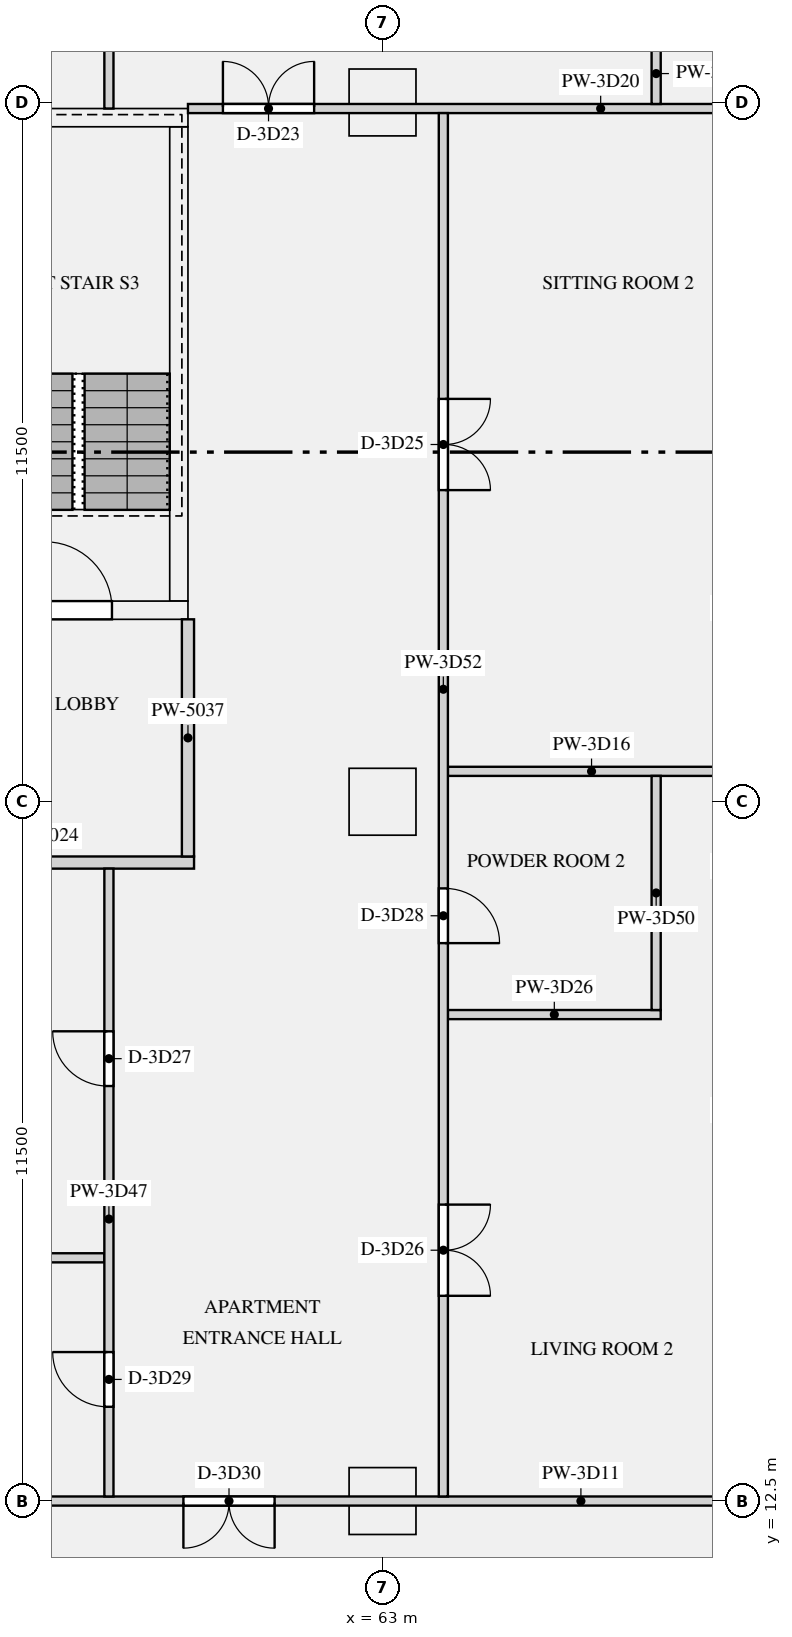
"""IFC4 building model, lengths in metres.
Left out: names, types, materials, properties, quantities, classifications, styles, units other than length and angle.
Written with IfcOpenShell. Run it as: python <this file> out.ifc"""

import sys

from ifc_helpers import new_model, si_unit, direction, frame, frame_2d, origin, origin_2d, place, context, subcontext, project, spatial, rectangle, extrude, element, fill, save


model = new_model("IFC4")
c1 = context("Model", 3, precision=1e-05, world=origin(), true_north=direction((0.0, 1.0)))
c2 = subcontext(c1, "Body", "Model", "MODEL_VIEW")
j1 = project(units=[si_unit("LENGTHUNIT", "METRE"), si_unit("PLANEANGLEUNIT", "RADIAN")], contexts=[c1])
p1 = place(None, origin())
s1 = spatial("IfcSite", under=j1, at=p1, CompositionType="ELEMENT")
p2 = place(p1, origin())
s2 = spatial("IfcBuilding", under=s1, at=p2, CompositionType="ELEMENT")
p3 = place(p2, frame((0.0, 0.0, 166.5)))
s3 = spatial("IfcBuildingStorey", under=s2, at=p3, CompositionType="ELEMENT", Elevation=166.5)
for number, where, z_axis, x_axis in (
    (1, (63.0, 24.0, 0.0), (0.0, 0.0, 1.0), (1.0, 0.0, 0.0)),
    (2, (63.0, 35.5, 0.0), (0.0, 0.0, 1.0), (1.0, 0.0, 0.0)),
    (3, (63.0, 12.5, 0.0), (0.0, 0.0, 1.0), (1.0, 0.0, 0.0)),
):
    element("IfcColumn", number, at=place(p3, frame(where, z_axis=z_axis, x_axis=x_axis)), inside=s3, PredefinedType="COLUMN", context=c2, shape_type="SweptSolid", body=[
        extrude(rectangle(XDim=1.1, YDim=1.1, at=origin_2d()), origin(), (0.0, 0.0, 1.0), 3.15),
    ])
p4 = place(p3, frame((56.2, 27.15, 0.0), z_axis=(0.0, 0.0, 1.0), x_axis=(1.0, 0.0, 0.0)))
e4 = element("IfcWall", 4, at=p4, inside=s3, PredefinedType="SHEAR", context=c2, shape_type="SweptSolid", body=[
    extrude(rectangle(XDim=3.6, YDim=0.3, at=frame_2d((1.8, 0.0))), origin(), (0.0, 0.0, 1.0), 3.15),
])
p5 = place(p4, frame((1.25, 0.0, 0.0)))
e5 = element("IfcOpeningElement", 5, at=p5, cuts=e4, PredefinedType="OPENING", context=c2, shape_type="SweptSolid", body=[
    extrude(rectangle(XDim=1.1, YDim=2.1, at=frame_2d((0.55, 1.05))), frame((0.0, 0.16, 0.0), z_axis=(0.0, -1.0, 0.0), x_axis=(1.0, 0.0, 0.0)), (0.0, 0.0, 1.0), 0.32),
])
p6 = place(p3, frame((56.2, 35.25, 0.0), z_axis=(0.0, 0.0, 1.0), x_axis=(1.0, 0.0, 0.0)))
e6 = element("IfcWall", 6, at=p6, inside=s3, PredefinedType="SHEAR", context=c2, shape_type="SweptSolid", body=[
    extrude(rectangle(XDim=3.6, YDim=0.3, at=frame_2d((1.8, 0.0))), origin(), (0.0, 0.0, 1.0), 3.15),
])
p7 = place(p3, frame((59.65, 27.3, 0.0), z_axis=(0.0, 0.0, 1.0), x_axis=(0.0, 1.0, 0.0)))
e7 = element("IfcWall", 7, at=p7, inside=s3, PredefinedType="SHEAR", context=c2, shape_type="SweptSolid", body=[
    extrude(rectangle(XDim=7.8, YDim=0.3, at=frame_2d((3.9, 0.0))), origin(), (0.0, 0.0, 1.0), 3.15),
])
p8 = place(p3, frame((54.9, 23.0, 0.0), z_axis=(0.0, 0.0, 1.0), x_axis=(1.0, 0.0, 0.0)))
e8 = element("IfcWall", 8, at=p8, inside=s3, PredefinedType="PARTITIONING", context=c2, shape_type="SweptSolid", body=[
    extrude(rectangle(XDim=5.0, YDim=0.2, at=frame_2d((2.5, 0.0))), origin(), (0.0, 0.0, 1.0), 2.83),
])
p9 = place(p3, frame((59.8, 23.1, 0.0), z_axis=(0.0, 0.0, 1.0), x_axis=(0.0, 1.0, 0.0)))
e9 = element("IfcWall", 9, at=p9, inside=s3, PredefinedType="PARTITIONING", context=c2, shape_type="SweptSolid", body=[
    extrude(rectangle(XDim=3.9, YDim=0.2, at=frame_2d((1.95, 0.0))), origin(), (0.0, 0.0, 1.0), 2.83),
])
p10 = place(p3, frame((54.0, 12.5, 0.0), z_axis=(0.0, 0.0, 1.0), x_axis=(1.0, 0.0, 0.0)))
e10 = element("IfcWall", 10, at=p10, inside=s3, PredefinedType="PARTITIONING", context=c2, shape_type="SweptSolid", body=[
    extrude(rectangle(XDim=17.3, YDim=0.15, at=frame_2d((8.65, 0.0))), origin(), (0.0, 0.0, 1.0), 2.83),
])
p11 = place(p10, frame((5.725, 0.0, 0.0)))
e11 = element("IfcOpeningElement", 11, at=p11, cuts=e10, PredefinedType="OPENING", context=c2, shape_type="SweptSolid", body=[
    extrude(rectangle(XDim=1.5, YDim=2.1, at=frame_2d((0.75, 1.05))), frame((0.0, 0.085, 0.0), z_axis=(0.0, -1.0, 0.0), x_axis=(1.0, 0.0, 0.0)), (0.0, 0.0, 1.0), 0.17),
])
p12 = place(p3, frame((54.1, 16.5, 0.0), z_axis=(0.0, 0.0, 1.0), x_axis=(1.0, 0.0, 0.0)))
e12 = element("IfcWall", 12, at=p12, inside=s3, PredefinedType="PARTITIONING", context=c2, shape_type="SweptSolid", body=[
    extrude(rectangle(XDim=4.325, YDim=0.15, at=frame_2d((2.163, 0.0))), origin(), (0.0, 0.0, 1.0), 2.83),
])
p13 = place(p3, frame((64.075, 24.5, 0.0), z_axis=(0.0, 0.0, 1.0), x_axis=(1.0, 0.0, 0.0)))
e13 = element("IfcWall", 13, at=p13, inside=s3, PredefinedType="PARTITIONING", context=c2, shape_type="SweptSolid", body=[
    extrude(rectangle(XDim=4.725, YDim=0.15, at=frame_2d((2.363, 0.0))), origin(), (0.0, 0.0, 1.0), 2.83),
])
p14 = place(p3, frame((59.8, 35.4, 0.0), z_axis=(0.0, 0.0, 1.0), x_axis=(1.0, 0.0, 0.0)))
e14 = element("IfcWall", 14, at=p14, inside=s3, PredefinedType="PARTITIONING", context=c2, shape_type="SweptSolid", body=[
    extrude(rectangle(XDim=11.5, YDim=0.15, at=frame_2d((5.75, 0.0))), origin(), (0.0, 0.0, 1.0), 2.83),
])
p15 = place(p14, frame((0.575, 0.0, 0.0)))
e15 = element("IfcOpeningElement", 15, at=p15, cuts=e14, PredefinedType="OPENING", context=c2, shape_type="SweptSolid", body=[
    extrude(rectangle(XDim=1.5, YDim=2.1, at=frame_2d((0.75, 1.05))), frame((0.0, 0.085, 0.0), z_axis=(0.0, -1.0, 0.0), x_axis=(1.0, 0.0, 0.0)), (0.0, 0.0, 1.0), 0.17),
])
p16 = place(p3, frame((64.075, 20.5, 0.0), z_axis=(0.0, 0.0, 1.0), x_axis=(1.0, 0.0, 0.0)))
e16 = element("IfcWall", 16, at=p16, inside=s3, PredefinedType="PARTITIONING", context=c2, shape_type="SweptSolid", body=[
    extrude(rectangle(XDim=3.5, YDim=0.15, at=frame_2d((1.75, 0.0))), origin(), (0.0, 0.0, 1.0), 2.83),
])
p17 = place(p3, frame((58.5, 12.575, 0.0), z_axis=(0.0, 0.0, 1.0), x_axis=(0.0, 1.0, 0.0)))
e17 = element("IfcWall", 17, at=p17, inside=s3, PredefinedType="PARTITIONING", context=c2, shape_type="SweptSolid", body=[
    extrude(rectangle(XDim=10.325, YDim=0.15, at=frame_2d((5.163, 0.0))), origin(), (0.0, 0.0, 1.0), 2.83),
])
p18 = place(p17, frame((6.75, 0.0, 0.0)))
e18 = element("IfcOpeningElement", 18, at=p18, cuts=e17, PredefinedType="OPENING", context=c2, shape_type="SweptSolid", body=[
    extrude(rectangle(XDim=0.9, YDim=2.1, at=frame_2d((0.45, 1.05))), frame((0.0, 0.085, 0.0), z_axis=(0.0, -1.0, 0.0), x_axis=(1.0, 0.0, 0.0)), (0.0, 0.0, 1.0), 0.17),
])
p19 = place(p17, frame((1.475, 0.0, 0.0)))
e19 = element("IfcOpeningElement", 19, at=p19, cuts=e17, PredefinedType="OPENING", context=c2, shape_type="SweptSolid", body=[
    extrude(rectangle(XDim=0.9, YDim=2.1, at=frame_2d((0.45, 1.05))), frame((0.0, 0.085, 0.0), z_axis=(0.0, -1.0, 0.0), x_axis=(1.0, 0.0, 0.0)), (0.0, 0.0, 1.0), 0.17),
])
p20 = place(p3, frame((58.5, 35.4, 0.0), z_axis=(0.0, 0.0, 1.0), x_axis=(0.0, 1.0, 0.0)))
e20 = element("IfcWall", 20, at=p20, inside=s3, PredefinedType="PARTITIONING", context=c2, shape_type="SweptSolid", body=[
    extrude(rectangle(XDim=7.4, YDim=0.15, at=frame_2d((3.7, 0.0))), origin(), (0.0, 0.0, 1.0), 2.83),
])
p21 = place(p20, frame((3.025, 0.0, 0.0)))
e21 = element("IfcOpeningElement", 21, at=p21, cuts=e20, PredefinedType="OPENING", context=c2, shape_type="SweptSolid", body=[
    extrude(rectangle(XDim=1.5, YDim=2.1, at=frame_2d((0.75, 1.05))), frame((0.0, 0.085, 0.0), z_axis=(0.0, -1.0, 0.0), x_axis=(1.0, 0.0, 0.0)), (0.0, 0.0, 1.0), 0.17),
])
p22 = place(p3, frame((67.5, 20.575, 0.0), z_axis=(0.0, 0.0, 1.0), x_axis=(0.0, 1.0, 0.0)))
e22 = element("IfcWall", 22, at=p22, inside=s3, PredefinedType="PARTITIONING", context=c2, shape_type="SweptSolid", body=[
    extrude(rectangle(XDim=3.85, YDim=0.15, at=frame_2d((1.925, 0.0))), origin(), (0.0, 0.0, 1.0), 2.83),
])
p23 = place(p3, frame((67.5, 35.475, 0.0), z_axis=(0.0, 0.0, 1.0), x_axis=(0.0, 1.0, 0.0)))
e23 = element("IfcWall", 23, at=p23, inside=s3, PredefinedType="PARTITIONING", context=c2, shape_type="SweptSolid", body=[
    extrude(rectangle(XDim=2.825, YDim=0.15, at=frame_2d((1.413, 0.0))), origin(), (0.0, 0.0, 1.0), 2.83),
])
p24 = place(p23, frame((1.0, 0.0, 0.0)))
e24 = element("IfcOpeningElement", 24, at=p24, cuts=e23, PredefinedType="OPENING", context=c2, shape_type="SweptSolid", body=[
    extrude(rectangle(XDim=0.9, YDim=2.1, at=frame_2d((0.45, 1.05))), frame((0.0, 0.085, 0.0), z_axis=(0.0, -1.0, 0.0), x_axis=(1.0, 0.0, 0.0)), (0.0, 0.0, 1.0), 0.17),
])
p25 = place(p3, frame((64.0, 12.575, 0.0), z_axis=(0.0, 0.0, 1.0), x_axis=(0.0, 1.0, 0.0)))
e25 = element("IfcWall", 25, at=p25, inside=s3, PredefinedType="PARTITIONING", context=c2, shape_type="SweptSolid", body=[
    extrude(rectangle(XDim=22.75, YDim=0.15, at=frame_2d((11.375, 0.0))), origin(), (0.0, 0.0, 1.0), 2.83),
])
p26 = place(p25, frame((16.55, 0.0, 0.0)))
e26 = element("IfcOpeningElement", 26, at=p26, cuts=e25, PredefinedType="OPENING", context=c2, shape_type="SweptSolid", body=[
    extrude(rectangle(XDim=1.5, YDim=2.1, at=frame_2d((0.75, 1.05))), frame((0.0, 0.085, 0.0), z_axis=(0.0, -1.0, 0.0), x_axis=(1.0, 0.0, 0.0)), (0.0, 0.0, 1.0), 0.17),
])
p27 = place(p25, frame((3.3, 0.0, 0.0)))
e27 = element("IfcOpeningElement", 27, at=p27, cuts=e25, PredefinedType="OPENING", context=c2, shape_type="SweptSolid", body=[
    extrude(rectangle(XDim=1.5, YDim=2.1, at=frame_2d((0.75, 1.05))), frame((0.0, 0.085, 0.0), z_axis=(0.0, -1.0, 0.0), x_axis=(1.0, 0.0, 0.0)), (0.0, 0.0, 1.0), 0.17),
])
p28 = place(p25, frame((9.1, 0.0, 0.0)))
e28 = element("IfcOpeningElement", 28, at=p28, cuts=e25, PredefinedType="OPENING", context=c2, shape_type="SweptSolid", body=[
    extrude(rectangle(XDim=0.9, YDim=2.1, at=frame_2d((0.45, 1.05))), frame((0.0, 0.085, 0.0), z_axis=(0.0, -1.0, 0.0), x_axis=(1.0, 0.0, 0.0)), (0.0, 0.0, 1.0), 0.17),
])
p29 = place(p5, origin())
e29 = element("IfcDoor", 29, at=p29, inside=s3, OperationType="SINGLE_SWING_LEFT", PredefinedType="DOOR", context=c2, shape_type="SweptSolid", body=[
    extrude(rectangle(XDim=1.1, YDim=2.1, at=frame_2d((0.55, 1.05))), frame((0.0, 0.025, 0.0), z_axis=(0.0, -1.0, 0.0), x_axis=(1.0, 0.0, 0.0)), (0.0, 0.0, 1.0), 0.05),
])
fill(e5, e29)
p30 = place(p15, origin())
e30 = element("IfcDoor", 30, at=p30, inside=s3, OperationType="DOUBLE_DOOR_SINGLE_SWING", PredefinedType="DOOR", context=c2, shape_type="SweptSolid", body=[
    extrude(rectangle(XDim=1.5, YDim=2.1, at=frame_2d((0.75, 1.05))), frame((0.0, 0.025, 0.0), z_axis=(0.0, -1.0, 0.0), x_axis=(1.0, 0.0, 0.0)), (0.0, 0.0, 1.0), 0.05),
])
fill(e15, e30)
p31 = place(p26, frame((1.5, 0.0, 0.0), z_axis=(0.0, 0.0, 1.0), x_axis=(-1.0, 0.0, 0.0)))
e31 = element("IfcDoor", 31, at=p31, inside=s3, OperationType="DOUBLE_DOOR_SINGLE_SWING", PredefinedType="DOOR", context=c2, shape_type="SweptSolid", body=[
    extrude(rectangle(XDim=1.5, YDim=2.1, at=frame_2d((0.75, 1.05))), frame((0.0, 0.025, 0.0), z_axis=(0.0, -1.0, 0.0), x_axis=(1.0, 0.0, 0.0)), (0.0, 0.0, 1.0), 0.05),
])
fill(e26, e31)
p32 = place(p27, frame((1.5, 0.0, 0.0), z_axis=(0.0, 0.0, 1.0), x_axis=(-1.0, 0.0, 0.0)))
e32 = element("IfcDoor", 32, at=p32, inside=s3, OperationType="DOUBLE_DOOR_SINGLE_SWING", PredefinedType="DOOR", context=c2, shape_type="SweptSolid", body=[
    extrude(rectangle(XDim=1.5, YDim=2.1, at=frame_2d((0.75, 1.05))), frame((0.0, 0.025, 0.0), z_axis=(0.0, -1.0, 0.0), x_axis=(1.0, 0.0, 0.0)), (0.0, 0.0, 1.0), 0.05),
])
fill(e27, e32)
p33 = place(p18, origin())
e33 = element("IfcDoor", 33, at=p33, inside=s3, OperationType="SINGLE_SWING_RIGHT", PredefinedType="DOOR", context=c2, shape_type="SweptSolid", body=[
    extrude(rectangle(XDim=0.9, YDim=2.1, at=frame_2d((0.45, 1.05))), frame((0.0, 0.025, 0.0), z_axis=(0.0, -1.0, 0.0), x_axis=(1.0, 0.0, 0.0)), (0.0, 0.0, 1.0), 0.05),
])
fill(e18, e33)
p34 = place(p28, frame((0.9, 0.0, 0.0), z_axis=(0.0, 0.0, 1.0), x_axis=(-1.0, 0.0, 0.0)))
e34 = element("IfcDoor", 34, at=p34, inside=s3, OperationType="SINGLE_SWING_RIGHT", PredefinedType="DOOR", context=c2, shape_type="SweptSolid", body=[
    extrude(rectangle(XDim=0.9, YDim=2.1, at=frame_2d((0.45, 1.05))), frame((0.0, 0.025, 0.0), z_axis=(0.0, -1.0, 0.0), x_axis=(1.0, 0.0, 0.0)), (0.0, 0.0, 1.0), 0.05),
])
fill(e28, e34)
p35 = place(p19, origin())
e35 = element("IfcDoor", 35, at=p35, inside=s3, OperationType="SINGLE_SWING_RIGHT", PredefinedType="DOOR", context=c2, shape_type="SweptSolid", body=[
    extrude(rectangle(XDim=0.9, YDim=2.1, at=frame_2d((0.45, 1.05))), frame((0.0, 0.025, 0.0), z_axis=(0.0, -1.0, 0.0), x_axis=(1.0, 0.0, 0.0)), (0.0, 0.0, 1.0), 0.05),
])
fill(e19, e35)
p36 = place(p11, frame((1.5, 0.0, 0.0), z_axis=(0.0, 0.0, 1.0), x_axis=(-1.0, 0.0, 0.0)))
e36 = element("IfcDoor", 36, at=p36, inside=s3, OperationType="DOUBLE_DOOR_SINGLE_SWING", PredefinedType="DOOR", context=c2, shape_type="SweptSolid", body=[
    extrude(rectangle(XDim=1.5, YDim=2.1, at=frame_2d((0.75, 1.05))), frame((0.0, 0.025, 0.0), z_axis=(0.0, -1.0, 0.0), x_axis=(1.0, 0.0, 0.0)), (0.0, 0.0, 1.0), 0.05),
])
fill(e11, e36)
save(model, sys.argv[1])
